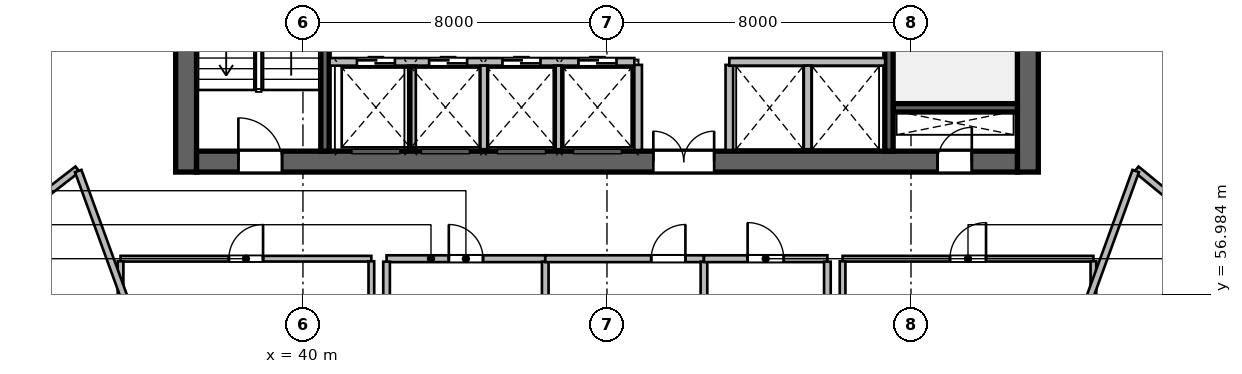
"""IFC4 building model, lengths in metres.
Left out: names, types, materials, properties, quantities, classifications, styles, units other than length and angle.
Written with IfcOpenShell. Run it as: python <this file> out.ifc"""

import sys

from ifc_helpers import new_model, si_unit, direction, frame, frame_2d, origin, place, context, subcontext, project, spatial, rectangle, extrude, source, transform, mapped, element, fill, save


model = new_model("IFC4")
c1 = context("Model", 3, precision=1e-05, world=origin(), true_north=direction((0.0, 1.0)))
c2 = subcontext(c1, "Body", "Model", "MODEL_VIEW")
j1 = project(units=[si_unit("LENGTHUNIT", "METRE"), si_unit("PLANEANGLEUNIT", "RADIAN")], contexts=[c1])
p1 = place(None, origin())
s1 = spatial("IfcSite", under=j1, at=p1, CompositionType="ELEMENT")
p2 = place(p1, origin())
s2 = spatial("IfcBuilding", under=s1, at=p2, CompositionType="ELEMENT")
p3 = place(p2, frame((0.0, 0.0, 64.2)))
s3 = spatial("IfcBuildingStorey", under=s2, at=p3, CompositionType="ELEMENT", Elevation=64.2)
m1 = source(origin(), c2, "Body", "SweptSolid", [
    extrude(rectangle(XDim=12.0, YDim=0.55, at=frame_2d((6.0, 0.0))), origin(), (0.0, 0.0, 1.0), 3.6),
])
for number, where, z_axis, x_axis in (
    (1, (36.925, 60.2, 0.0), (0.0, 0.0, 1.0), (0.0, 1.0, 0.0)),
    (2, (59.075, 60.2, 0.0), (0.0, 0.0, 1.0), (0.0, 1.0, 0.0)),
):
    element("IfcWall", number, at=place(p3, frame(where, z_axis=z_axis, x_axis=x_axis)), inside=s3, PredefinedType="SHEAR", context=c2, shape_type="MappedRepresentation", body=[
        mapped(m1, transform((0.0, 0.0, 0.0), scale=1.0)),
    ])
m2 = source(origin(), c2, "Body", "SweptSolid", [
    extrude(rectangle(XDim=21.6, YDim=0.55, at=frame_2d((10.8, 0.0))), origin(), (0.0, 0.0, 1.0), 3.6),
])
p4 = place(p3, frame((37.2, 60.475, 0.0), z_axis=(0.0, 0.0, 1.0), x_axis=(1.0, 0.0, 0.0)))
e3 = element("IfcWall", 3, at=p4, inside=s3, PredefinedType="SHEAR", context=c2, shape_type="MappedRepresentation", body=[
    mapped(m2, transform((0.0, 0.0, 0.0), scale=1.0)),
])
p5 = place(p4, frame((1.1, 0.0, 0.0)))
e4 = element("IfcOpeningElement", 4, at=p5, cuts=e3, PredefinedType="OPENING", context=c2, shape_type="SweptSolid", body=[
    extrude(rectangle(XDim=1.15, YDim=2.15, at=frame_2d((0.575, 1.075))), frame((0.0, 0.285, 0.0), z_axis=(0.0, -1.0, 0.0), x_axis=(1.0, 0.0, 0.0)), (0.0, 0.0, 1.0), 0.57),
])
p6 = place(p4, frame((19.5, 0.0, 0.0)))
e5 = element("IfcOpeningElement", 5, at=p6, cuts=e3, PredefinedType="OPENING", context=c2, shape_type="SweptSolid", body=[
    extrude(rectangle(XDim=0.9, YDim=2.1, at=frame_2d((0.45, 1.05))), frame((0.0, 0.285, 0.0), z_axis=(0.0, -1.0, 0.0), x_axis=(1.0, 0.0, 0.0)), (0.0, 0.0, 1.0), 0.57),
])
p7 = place(p4, frame((12.02, 0.0, 0.0)))
e6 = element("IfcOpeningElement", 6, at=p7, cuts=e3, PredefinedType="OPENING", context=c2, shape_type="SweptSolid", body=[
    extrude(rectangle(XDim=1.6, YDim=2.15, at=frame_2d((0.8, 1.075))), frame((0.0, 0.285, 0.0), z_axis=(0.0, -1.0, 0.0), x_axis=(1.0, 0.0, 0.0)), (0.0, 0.0, 1.0), 0.57),
])
m3 = source(origin(), c2, "Body", "SweptSolid", [
    extrude(rectangle(XDim=3.27, YDim=0.22, at=frame_2d((1.635, 0.0))), origin(), (0.0, 0.0, 1.0), 3.6),
])
p8 = place(p3, frame((55.53, 61.89, 0.0), z_axis=(0.0, 0.0, 1.0), x_axis=(1.0, 0.0, 0.0)))
e7 = element("IfcWall", 7, at=p8, inside=s3, PredefinedType="SHEAR", context=c2, shape_type="MappedRepresentation", body=[
    mapped(m3, transform((0.0, 0.0, 0.0), scale=1.0)),
])
m4 = source(origin(), c2, "Body", "SweptSolid", [
    extrude(rectangle(XDim=10.9, YDim=0.22, at=frame_2d((5.45, 0.0))), origin(), (0.0, 0.0, 1.0), 3.6),
])
p9 = place(p3, frame((40.58, 60.75, 0.0), z_axis=(0.0, 0.0, 1.0), x_axis=(0.0, 1.0, 0.0)))
e8 = element("IfcWall", 8, at=p9, inside=s3, PredefinedType="SHEAR", context=c2, shape_type="MappedRepresentation", body=[
    mapped(m4, transform((0.0, 0.0, 0.0), scale=1.0)),
])
p10 = place(p3, frame((55.42, 60.75, 0.0), z_axis=(0.0, 0.0, 1.0), x_axis=(0.0, 1.0, 0.0)))
e9 = element("IfcWall", 9, at=p10, inside=s3, PredefinedType="SHEAR", context=c2, shape_type="MappedRepresentation", body=[
    mapped(m4, transform((0.0, 0.0, 0.0), scale=1.0)),
])
p11 = place(p10, frame((9.495, 0.0, 0.0)))
e10 = element("IfcOpeningElement", 10, at=p11, cuts=e9, PredefinedType="OPENING", context=c2, shape_type="SweptSolid", body=[
    extrude(rectangle(XDim=1.15, YDim=2.15, at=frame_2d((0.575, 1.075))), frame((0.0, 0.12, 0.0), z_axis=(0.0, -1.0, 0.0), x_axis=(1.0, 0.0, 0.0)), (0.0, 0.0, 1.0), 0.24),
])
m5 = source(origin(), c2, "Body", "SweptSolid", [
    extrude(rectangle(XDim=2.24, YDim=0.2, at=frame_2d((1.12, 0.0))), origin(), (0.0, 0.0, 1.0), 3.36),
])
for number, where, z_axis, x_axis in (
    (11, (48.82, 60.78, 0.0), (0.0, 0.0, 1.0), (0.0, 1.0, 0.0)),
    (12, (51.22, 60.78, 0.0), (0.0, 0.0, 1.0), (0.0, 1.0, 0.0)),
):
    element("IfcWall", number, at=place(p3, frame(where, z_axis=z_axis, x_axis=x_axis)), inside=s3, PredefinedType="SOLIDWALL", context=c2, shape_type="MappedRepresentation", body=[
        mapped(m5, transform((0.0, 0.0, 0.0), scale=1.0)),
    ])
m6 = source(origin(), c2, "Body", "SweptSolid", [
    extrude(rectangle(XDim=8.02, YDim=0.2, at=frame_2d((4.01, 0.0))), origin(), (0.0, 0.0, 1.0), 3.36),
])
p12 = place(p3, frame((40.7, 63.1, 0.0), z_axis=(0.0, 0.0, 1.0), x_axis=(1.0, 0.0, 0.0)))
e13 = element("IfcWall", 13, at=p12, inside=s3, PredefinedType="SOLIDWALL", context=c2, shape_type="MappedRepresentation", body=[
    mapped(m6, transform((0.0, 0.0, 0.0), scale=1.0)),
])
p13 = place(p12, frame((0.72, 0.0, 0.0)))
e14 = element("IfcOpeningElement", 14, at=p13, cuts=e13, PredefinedType="OPENING", context=c2, shape_type="SweptSolid", body=[
    extrude(rectangle(XDim=1.0, YDim=2.15, at=frame_2d((0.5, 1.075))), frame((0.0, 0.11, 0.0), z_axis=(0.0, -1.0, 0.0), x_axis=(1.0, 0.0, 0.0)), (0.0, 0.0, 1.0), 0.22),
])
p14 = place(p12, frame((2.62, 0.0, 0.0)))
e15 = element("IfcOpeningElement", 15, at=p14, cuts=e13, PredefinedType="OPENING", context=c2, shape_type="SweptSolid", body=[
    extrude(rectangle(XDim=1.0, YDim=2.15, at=frame_2d((0.5, 1.075))), frame((0.0, 0.11, 0.0), z_axis=(0.0, -1.0, 0.0), x_axis=(1.0, 0.0, 0.0)), (0.0, 0.0, 1.0), 0.22),
])
p15 = place(p12, frame((4.55, 0.0, 0.0)))
e16 = element("IfcOpeningElement", 16, at=p15, cuts=e13, PredefinedType="OPENING", context=c2, shape_type="SweptSolid", body=[
    extrude(rectangle(XDim=1.0, YDim=2.15, at=frame_2d((0.5, 1.075))), frame((0.0, 0.11, 0.0), z_axis=(0.0, -1.0, 0.0), x_axis=(1.0, 0.0, 0.0)), (0.0, 0.0, 1.0), 0.22),
])
p16 = place(p12, frame((6.55, 0.0, 0.0)))
e17 = element("IfcOpeningElement", 17, at=p16, cuts=e13, PredefinedType="OPENING", context=c2, shape_type="SweptSolid", body=[
    extrude(rectangle(XDim=1.0, YDim=2.15, at=frame_2d((0.5, 1.075))), frame((0.0, 0.11, 0.0), z_axis=(0.0, -1.0, 0.0), x_axis=(1.0, 0.0, 0.0)), (0.0, 0.0, 1.0), 0.22),
])
m7 = source(origin(), c2, "Body", "SweptSolid", [
    extrude(rectangle(XDim=4.1, YDim=0.2, at=frame_2d((2.05, 0.0))), origin(), (0.0, 0.0, 1.0), 3.36),
])
p17 = place(p3, frame((51.22, 63.1, 0.0), z_axis=(0.0, 0.0, 1.0), x_axis=(1.0, 0.0, 0.0)))
e18 = element("IfcWall", 18, at=p17, inside=s3, PredefinedType="SOLIDWALL", context=c2, shape_type="MappedRepresentation", body=[
    mapped(m7, transform((0.0, 0.0, 0.0), scale=1.0)),
])
m8 = source(origin(), c2, "Body", "SweptSolid", [
    extrude(rectangle(XDim=2.2, YDim=0.2, at=frame_2d((1.1, 0.0))), origin(), (0.0, 0.0, 1.0), 3.36),
])
for number, where, z_axis, x_axis in (
    (19, (42.87, 60.8, 0.0), (0.0, 0.0, 1.0), (0.0, 1.0, 0.0)),
    (20, (44.77, 60.8, 0.0), (0.0, 0.0, 1.0), (0.0, 1.0, 0.0)),
    (21, (46.7, 60.8, 0.0), (0.0, 0.0, 1.0), (0.0, 1.0, 0.0)),
    (22, (53.28, 60.8, 0.0), (0.0, 0.0, 1.0), (0.0, 1.0, 0.0)),
):
    element("IfcWall", number, at=place(p3, frame(where, z_axis=z_axis, x_axis=x_axis)), inside=s3, PredefinedType="SOLIDWALL", context=c2, shape_type="MappedRepresentation", body=[
        mapped(m8, transform((0.0, 0.0, 0.0), scale=1.0)),
    ])
m9 = source(origin(), c2, "Body", "SweptSolid", [
    extrude(rectangle(XDim=6.6, YDim=0.15, at=frame_2d((3.3, 0.0))), origin(), (0.0, 0.0, 1.0), 3.36),
])
p18 = place(p3, frame((35.2, 57.92, 0.0), z_axis=(0.0, 0.0, 1.0), x_axis=(1.0, 0.0, 0.0)))
e23 = element("IfcWall", 23, at=p18, inside=s3, PredefinedType="PARTITIONING", context=c2, shape_type="MappedRepresentation", body=[
    mapped(m9, transform((0.0, 0.0, 0.0), scale=1.0)),
])
p19 = place(p18, frame((2.85, 0.0, 0.0)))
e24 = element("IfcOpeningElement", 24, at=p19, cuts=e23, PredefinedType="OPENING", context=c2, shape_type="SweptSolid", body=[
    extrude(rectangle(XDim=0.9, YDim=2.1, at=frame_2d((0.45, 1.05))), frame((0.0, 0.085, 0.0), z_axis=(0.0, -1.0, 0.0), x_axis=(1.0, 0.0, 0.0)), (0.0, 0.0, 1.0), 0.17),
])
m10 = source(origin(), c2, "Body", "SweptSolid", [
    extrude(rectangle(XDim=3.785, YDim=0.15, at=frame_2d((1.893, 0.0))), origin(), (0.0, 0.0, 1.0), 3.36),
])
for number, where, z_axis, x_axis in (
    (25, (35.2, 54.067, 0.0), (0.0, 0.0, 1.0), (0.0, 1.0, 0.0)),
    (26, (41.8, 54.067, 0.0), (0.0, 0.0, 1.0), (0.0, 1.0, 0.0)),
):
    element("IfcWall", number, at=place(p3, frame(where, z_axis=z_axis, x_axis=x_axis)), inside=s3, PredefinedType="PARTITIONING", context=c2, shape_type="MappedRepresentation", body=[
        mapped(m10, transform((0.0, 0.0, 0.0), scale=1.0)),
    ])
m11 = source(origin(), c2, "Body", "SweptSolid", [
    extrude(rectangle(XDim=4.176, YDim=0.18, at=frame_2d((2.088, 0.0))), origin(), (0.0, 0.0, 1.0), 3.36),
])
p20 = place(p3, frame((42.2, 57.92, 0.0), z_axis=(0.0, 0.0, 1.0), x_axis=(1.0, 0.0, 0.0)))
e27 = element("IfcWall", 27, at=p20, inside=s3, PredefinedType="PLUMBINGWALL", context=c2, shape_type="MappedRepresentation", body=[
    mapped(m11, transform((0.0, 0.0, 0.0), scale=1.0)),
])
p21 = place(p20, frame((1.638, 0.0, 0.0)))
e28 = element("IfcOpeningElement", 28, at=p21, cuts=e27, PredefinedType="OPENING", context=c2, shape_type="SweptSolid", body=[
    extrude(rectangle(XDim=0.9, YDim=2.08, at=frame_2d((0.45, 1.04))), frame((0.0, 0.1, 0.0), z_axis=(0.0, -1.0, 0.0), x_axis=(1.0, 0.0, 0.0)), (0.0, 0.0, 1.0), 0.2),
])
m12 = source(origin(), c2, "Body", "SweptSolid", [
    extrude(rectangle(XDim=3.763, YDim=0.175, at=frame_2d((1.881, 0.0))), origin(), (0.0, 0.0, 1.0), 3.36),
])
for number, where, z_axis, x_axis in (
    (29, (42.2, 54.079, 0.0), (0.0, 0.0, 1.0), (0.0, 1.0, 0.0)),
    (30, (46.376, 54.079, 0.0), (0.0, 0.0, 1.0), (0.0, 1.0, 0.0)),
):
    element("IfcWall", number, at=place(p3, frame(where, z_axis=z_axis, x_axis=x_axis)), inside=s3, PredefinedType="PARTITIONING", context=c2, shape_type="MappedRepresentation", body=[
        mapped(m12, transform((0.0, 0.0, 0.0), scale=1.0)),
    ])
p22 = place(p3, frame((46.376, 57.92, 0.0), z_axis=(0.0, 0.0, 1.0), x_axis=(1.0, 0.0, 0.0)))
e31 = element("IfcWall", 31, at=p22, inside=s3, PredefinedType="PLUMBINGWALL", context=c2, shape_type="MappedRepresentation", body=[
    mapped(m11, transform((0.0, 0.0, 0.0), scale=1.0)),
])
p23 = place(p22, frame((2.788, 0.0, 0.0)))
e32 = element("IfcOpeningElement", 32, at=p23, cuts=e31, PredefinedType="OPENING", context=c2, shape_type="SweptSolid", body=[
    extrude(rectangle(XDim=0.9, YDim=2.08, at=frame_2d((0.45, 1.04))), frame((0.0, 0.1, 0.0), z_axis=(0.0, -1.0, 0.0), x_axis=(1.0, 0.0, 0.0)), (0.0, 0.0, 1.0), 0.2),
])
p24 = place(p3, frame((50.552, 54.079, 0.0), z_axis=(0.0, 0.0, 1.0), x_axis=(0.0, 1.0, 0.0)))
e33 = element("IfcWall", 33, at=p24, inside=s3, PredefinedType="PARTITIONING", context=c2, shape_type="MappedRepresentation", body=[
    mapped(m12, transform((0.0, 0.0, 0.0), scale=1.0)),
])
m13 = source(origin(), c2, "Body", "SweptSolid", [
    extrude(rectangle(XDim=3.248, YDim=0.18, at=frame_2d((1.624, 0.0))), origin(), (0.0, 0.0, 1.0), 3.36),
])
p25 = place(p3, frame((50.552, 57.92, 0.0), z_axis=(0.0, 0.0, 1.0), x_axis=(1.0, 0.0, 0.0)))
e34 = element("IfcWall", 34, at=p25, inside=s3, PredefinedType="PLUMBINGWALL", context=c2, shape_type="MappedRepresentation", body=[
    mapped(m13, transform((0.0, 0.0, 0.0), scale=1.0)),
])
p26 = place(p25, frame((1.149, 0.0, 0.0)))
e35 = element("IfcOpeningElement", 35, at=p26, cuts=e34, PredefinedType="OPENING", context=c2, shape_type="SweptSolid", body=[
    extrude(rectangle(XDim=0.95, YDim=2.12, at=frame_2d((0.475, 1.06))), frame((0.0, 0.1, 0.0), z_axis=(0.0, -1.0, 0.0), x_axis=(1.0, 0.0, 0.0)), (0.0, 0.0, 1.0), 0.2),
])
p27 = place(p3, frame((53.8, 54.079, 0.0), z_axis=(0.0, 0.0, 1.0), x_axis=(0.0, 1.0, 0.0)))
e36 = element("IfcWall", 36, at=p27, inside=s3, PredefinedType="PARTITIONING", context=c2, shape_type="MappedRepresentation", body=[
    mapped(m12, transform((0.0, 0.0, 0.0), scale=1.0)),
])
p28 = place(p3, frame((54.2, 57.92, 0.0), z_axis=(0.0, 0.0, 1.0), x_axis=(1.0, 0.0, 0.0)))
e37 = element("IfcWall", 37, at=p28, inside=s3, PredefinedType="PARTITIONING", context=c2, shape_type="MappedRepresentation", body=[
    mapped(m9, transform((0.0, 0.0, 0.0), scale=1.0)),
])
p29 = place(p28, frame((2.825, 0.0, 0.0)))
e38 = element("IfcOpeningElement", 38, at=p29, cuts=e37, PredefinedType="OPENING", context=c2, shape_type="SweptSolid", body=[
    extrude(rectangle(XDim=0.95, YDim=2.1, at=frame_2d((0.475, 1.05))), frame((0.0, 0.085, 0.0), z_axis=(0.0, -1.0, 0.0), x_axis=(1.0, 0.0, 0.0)), (0.0, 0.0, 1.0), 0.17),
])
for number, where, z_axis, x_axis in (
    (39, (54.2, 54.067, 0.0), (0.0, 0.0, 1.0), (0.0, 1.0, 0.0)),
    (40, (60.8, 54.067, 0.0), (0.0, 0.0, 1.0), (0.0, 1.0, 0.0)),
):
    element("IfcWall", number, at=place(p3, frame(where, z_axis=z_axis, x_axis=x_axis)), inside=s3, PredefinedType="PARTITIONING", context=c2, shape_type="MappedRepresentation", body=[
        mapped(m10, transform((0.0, 0.0, 0.0), scale=1.0)),
    ])
m14 = source(origin(), c2, "Body", "SweptSolid", [
    extrude(rectangle(XDim=4.855, YDim=0.18, at=frame_2d((2.427, 0.0))), origin(), (0.0, 0.0, 1.0), 3.36),
])
p30 = place(p3, frame((30.229, 57.305, 0.0), z_axis=(0.0, 0.0, 1.0), x_axis=(0.790930965655, 0.611905391028, 0.0)))
e41 = element("IfcWall", 41, at=p30, inside=s3, PredefinedType="PLUMBINGWALL", context=c2, shape_type="MappedRepresentation", body=[
    mapped(m14, transform((0.0, 0.0, 0.0), scale=1.0)),
])
p31 = place(p30, frame((1.952, 0.0, 0.0)))
e42 = element("IfcOpeningElement", 42, at=p31, cuts=e41, PredefinedType="OPENING", context=c2, shape_type="SweptSolid", body=[
    extrude(rectangle(XDim=0.95, YDim=2.1, at=frame_2d((0.475, 1.05))), frame((0.0, 0.1, 0.0), z_axis=(0.0, -1.0, 0.0), x_axis=(1.0, 0.0, 0.0)), (0.0, 0.0, 1.0), 0.2),
])
m15 = source(origin(), c2, "Body", "SweptSolid", [
    extrude(rectangle(XDim=11.811, YDim=0.18, at=frame_2d((5.906, 0.0))), origin(), (0.0, 0.0, 1.0), 3.36),
])
p32 = place(p3, frame((35.562, 46.71, 0.0), z_axis=(0.0, 0.0, 1.0), x_axis=(-0.449626289102, 0.893216771086, 0.0)))
e43 = element("IfcWall", 43, at=p32, inside=s3, PredefinedType="PLUMBINGWALL", context=c2, shape_type="MappedRepresentation", body=[
    mapped(m15, transform((0.0, 0.0, 0.0), scale=1.0)),
])
m16 = source(origin(), c2, "Body", "SweptSolid", [
    extrude(rectangle(XDim=12.196, YDim=0.18, at=frame_2d((6.098, 0.0))), origin(), (0.0, 0.0, 1.0), 3.36),
])
p33 = place(p3, frame((38.258, 48.766, 0.0), z_axis=(0.0, 0.0, 1.0), x_axis=(-0.342022711534, 0.939691686031, 0.0)))
e44 = element("IfcWall", 44, at=p33, inside=s3, PredefinedType="PLUMBINGWALL", context=c2, shape_type="MappedRepresentation", body=[
    mapped(m16, transform((0.0, 0.0, 0.0), scale=1.0)),
])
m17 = source(origin(), c2, "Body", "SweptSolid", [
    extrude(rectangle(XDim=6.721, YDim=0.18, at=frame_2d((3.361, 0.0))), origin(), (0.0, 0.0, 1.0), 3.36),
])
p34 = place(p3, frame((61.931, 60.275, 0.0), z_axis=(0.0, 0.0, 1.0), x_axis=(0.772828051199, -0.63461547671, 0.0)))
e45 = element("IfcWall", 45, at=p34, inside=s3, PredefinedType="PLUMBINGWALL", context=c2, shape_type="MappedRepresentation", body=[
    mapped(m17, transform((0.0, 0.0, 0.0), scale=1.0)),
])
p35 = place(p34, frame((2.885, 0.0, 0.0)))
e46 = element("IfcOpeningElement", 46, at=p35, cuts=e45, PredefinedType="OPENING", context=c2, shape_type="SweptSolid", body=[
    extrude(rectangle(XDim=0.95, YDim=2.15, at=frame_2d((0.475, 1.075))), frame((0.0, 0.1, 0.0), z_axis=(0.0, -1.0, 0.0), x_axis=(1.0, 0.0, 0.0)), (0.0, 0.0, 1.0), 0.2),
])
p36 = place(p3, frame((57.742, 48.766, 0.0), z_axis=(0.0, 0.0, 1.0), x_axis=(0.342022711534, 0.939691686031, 0.0)))
e47 = element("IfcWall", 47, at=p36, inside=s3, PredefinedType="PLUMBINGWALL", context=c2, shape_type="MappedRepresentation", body=[
    mapped(m16, transform((0.0, 0.0, 0.0), scale=1.0)),
])
m18 = source(origin(), c2, "Body", "SweptSolid", [
    extrude(rectangle(XDim=1.15, YDim=2.15, at=frame_2d((0.575, 1.075))), frame((0.0, 0.025, 0.0), z_axis=(0.0, -1.0, 0.0), x_axis=(1.0, 0.0, 0.0)), (0.0, 0.0, 1.0), 0.05),
])
p37 = place(p5, origin())
e48 = element("IfcDoor", 48, at=p37, inside=s3, OperationType="SINGLE_SWING_LEFT", PredefinedType="DOOR", context=c2, shape_type="MappedRepresentation", body=[
    mapped(m18, transform((0.0, 0.0, 0.0), scale=1.0)),
])
fill(e4, e48)
m19 = source(origin(), c2, "Body", "SweptSolid", [
    extrude(rectangle(XDim=0.9, YDim=2.1, at=frame_2d((0.45, 1.05))), frame((0.0, 0.025, 0.0), z_axis=(0.0, -1.0, 0.0), x_axis=(1.0, 0.0, 0.0)), (0.0, 0.0, 1.0), 0.05),
])
p38 = place(p6, origin())
e49 = element("IfcDoor", 49, at=p38, inside=s3, OperationType="SINGLE_SWING_RIGHT", PredefinedType="DOOR", context=c2, shape_type="MappedRepresentation", body=[
    mapped(m19, transform((0.0, 0.0, 0.0), scale=1.0)),
])
fill(e5, e49)
m20 = source(origin(), c2, "Body", "SweptSolid", [
    extrude(rectangle(XDim=1.6, YDim=2.15, at=frame_2d((0.8, 1.075))), frame((0.0, 0.025, 0.0), z_axis=(0.0, -1.0, 0.0), x_axis=(1.0, 0.0, 0.0)), (0.0, 0.0, 1.0), 0.05),
])
p39 = place(p7, origin())
e50 = element("IfcDoor", 50, at=p39, inside=s3, OperationType="DOUBLE_DOOR_SINGLE_SWING", PredefinedType="DOOR", context=c2, shape_type="MappedRepresentation", body=[
    mapped(m20, transform((0.0, 0.0, 0.0), scale=1.0)),
])
fill(e6, e50)
m21 = source(origin(), c2, "Body", "SweptSolid", [
    extrude(rectangle(XDim=1.0, YDim=2.15, at=frame_2d((0.5, 1.075))), frame((0.0, 0.025, 0.0), z_axis=(0.0, -1.0, 0.0), x_axis=(1.0, 0.0, 0.0)), (0.0, 0.0, 1.0), 0.05),
])
p40 = place(p13, origin())
e51 = element("IfcDoor", 51, at=p40, inside=s3, OperationType="DOUBLE_DOOR_SLIDING", PredefinedType="DOOR", context=c2, shape_type="MappedRepresentation", body=[
    mapped(m21, transform((0.0, 0.0, 0.0), scale=1.0)),
])
fill(e14, e51)
p41 = place(p14, origin())
e52 = element("IfcDoor", 52, at=p41, inside=s3, OperationType="DOUBLE_DOOR_SLIDING", PredefinedType="DOOR", context=c2, shape_type="MappedRepresentation", body=[
    mapped(m21, transform((0.0, 0.0, 0.0), scale=1.0)),
])
fill(e15, e52)
p42 = place(p15, origin())
e53 = element("IfcDoor", 53, at=p42, inside=s3, OperationType="DOUBLE_DOOR_SLIDING", PredefinedType="DOOR", context=c2, shape_type="MappedRepresentation", body=[
    mapped(m21, transform((0.0, 0.0, 0.0), scale=1.0)),
])
fill(e16, e53)
p43 = place(p16, origin())
e54 = element("IfcDoor", 54, at=p43, inside=s3, OperationType="DOUBLE_DOOR_SLIDING", PredefinedType="DOOR", context=c2, shape_type="MappedRepresentation", body=[
    mapped(m21, transform((0.0, 0.0, 0.0), scale=1.0)),
])
fill(e17, e54)
p44 = place(p19, origin())
e55 = element("IfcDoor", 55, at=p44, inside=s3, OperationType="SINGLE_SWING_RIGHT", PredefinedType="DOOR", context=c2, shape_type="MappedRepresentation", body=[
    mapped(m19, transform((0.0, 0.0, 0.0), scale=1.0)),
])
fill(e24, e55)
m22 = source(origin(), c2, "Body", "SweptSolid", [
    extrude(rectangle(XDim=0.9, YDim=2.08, at=frame_2d((0.45, 1.04))), frame((0.0, 0.025, 0.0), z_axis=(0.0, -1.0, 0.0), x_axis=(1.0, 0.0, 0.0)), (0.0, 0.0, 1.0), 0.05),
])
p45 = place(p21, origin())
e56 = element("IfcDoor", 56, at=p45, inside=s3, OperationType="SINGLE_SWING_LEFT", PredefinedType="DOOR", context=c2, shape_type="MappedRepresentation", body=[
    mapped(m22, transform((0.0, 0.0, 0.0), scale=1.0)),
])
fill(e28, e56)
p46 = place(p23, origin())
e57 = element("IfcDoor", 57, at=p46, inside=s3, OperationType="SINGLE_SWING_RIGHT", PredefinedType="DOOR", context=c2, shape_type="MappedRepresentation", body=[
    mapped(m22, transform((0.0, 0.0, 0.0), scale=1.0)),
])
fill(e32, e57)
m23 = source(origin(), c2, "Body", "SweptSolid", [
    extrude(rectangle(XDim=0.95, YDim=2.12, at=frame_2d((0.475, 1.06))), frame((0.0, 0.025, 0.0), z_axis=(0.0, -1.0, 0.0), x_axis=(1.0, 0.0, 0.0)), (0.0, 0.0, 1.0), 0.05),
])
p47 = place(p26, origin())
e58 = element("IfcDoor", 58, at=p47, inside=s3, OperationType="SINGLE_SWING_LEFT", PredefinedType="DOOR", context=c2, shape_type="MappedRepresentation", body=[
    mapped(m23, transform((0.0, 0.0, 0.0), scale=1.0)),
])
fill(e35, e58)
m24 = source(origin(), c2, "Body", "SweptSolid", [
    extrude(rectangle(XDim=0.95, YDim=2.1, at=frame_2d((0.475, 1.05))), frame((0.0, 0.025, 0.0), z_axis=(0.0, -1.0, 0.0), x_axis=(1.0, 0.0, 0.0)), (0.0, 0.0, 1.0), 0.05),
])
p48 = place(p29, origin())
e59 = element("IfcDoor", 59, at=p48, inside=s3, OperationType="SINGLE_SWING_RIGHT", PredefinedType="DOOR", context=c2, shape_type="MappedRepresentation", body=[
    mapped(m24, transform((0.0, 0.0, 0.0), scale=1.0)),
])
fill(e38, e59)
save(model, sys.argv[1])
